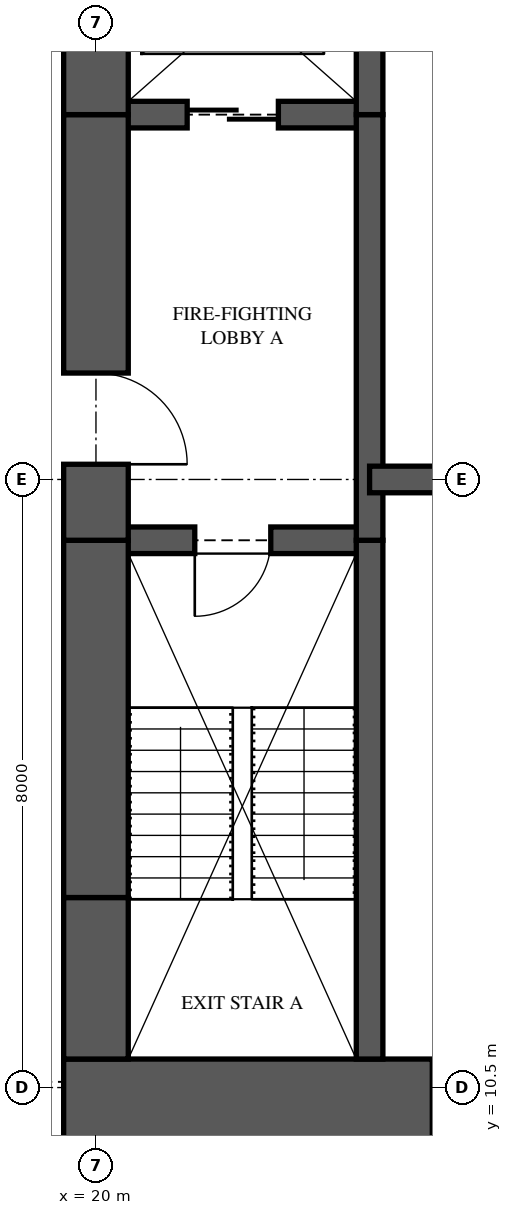
"""IFC4 building model, lengths in metres.
Left out: names, types, materials, properties, quantities, classifications, styles, units other than length and angle.
Written with IfcOpenShell. Run it as: python <this file> out.ifc"""

import sys

from ifc_helpers import new_model, si_unit, direction, frame, frame_2d, origin, place, context, subcontext, project, spatial, rectangle, extrude, element, fill, save


model = new_model("IFC4")
c1 = context("Model", 3, precision=1e-05, world=origin(), true_north=direction((0.0, 1.0)))
c2 = subcontext(c1, "Body", "Model", "MODEL_VIEW")
j1 = project(units=[si_unit("LENGTHUNIT", "METRE"), si_unit("PLANEANGLEUNIT", "RADIAN")], contexts=[c1])
p1 = place(None, origin())
s1 = spatial("IfcSite", under=j1, at=p1, CompositionType="ELEMENT")
p2 = place(p1, origin())
s2 = spatial("IfcBuilding", under=s1, at=p2, CompositionType="ELEMENT")
p3 = place(p2, frame((0.0, 0.0, 124.95)))
s3 = spatial("IfcBuildingStorey", under=s2, at=p3, CompositionType="ELEMENT", Elevation=124.95)
p4 = place(p3, frame((19.575, 10.125, 0.0), z_axis=(0.0, 0.0, 1.0), x_axis=(1.0, 0.0, 0.0)))
e1 = element("IfcWall", 1, at=p4, inside=s3, PredefinedType="SHEAR", context=c2, shape_type="SweptSolid", body=[
    extrude(rectangle(XDim=6.425, YDim=1.5, at=frame_2d((3.212, 0.0))), origin(), (0.0, 0.0, 1.0), 3.35),
])
p5 = place(p4, frame((4.85, 0.0, 0.0)))
e2 = element("IfcOpeningElement", 2, at=p5, cuts=e1, PredefinedType="OPENING", context=c2, shape_type="SweptSolid", body=[
    extrude(rectangle(XDim=0.75, YDim=2.1, at=frame_2d((0.375, 1.05))), frame((0.0, 0.76, 0.0), z_axis=(0.0, -1.0, 0.0), x_axis=(1.0, 0.0, 0.0)), (0.0, 0.0, 1.0), 1.52),
])
p6 = place(p3, frame((20.0, 26.125, 0.0), z_axis=(0.0, 0.0, 1.0), x_axis=(0.0, -1.0, 0.0)))
e3 = element("IfcWall", 3, at=p6, inside=s3, PredefinedType="SHEAR", context=c2, shape_type="SweptSolid", body=[
    extrude(rectangle(XDim=2.825, YDim=0.85, at=frame_2d((1.413, 0.0))), origin(), (0.0, 0.0, 1.0), 3.35),
])
p7 = place(p3, frame((20.0, 23.3, 0.0), z_axis=(0.0, 0.0, 1.0), x_axis=(0.0, -1.0, 0.0)))
e4 = element("IfcWall", 4, at=p7, inside=s3, PredefinedType="SHEAR", context=c2, shape_type="SweptSolid", body=[
    extrude(rectangle(XDim=5.6, YDim=0.85, at=frame_2d((2.8, 0.0))), origin(), (0.0, 0.0, 1.0), 3.35),
])
p8 = place(p7, frame((3.4, 0.0, 0.0)))
e5 = element("IfcOpeningElement", 5, at=p8, cuts=e4, PredefinedType="OPENING", context=c2, shape_type="SweptSolid", body=[
    extrude(rectangle(XDim=1.2, YDim=2.2, at=frame_2d((0.6, 1.1))), frame((0.0, 0.435, 0.0), z_axis=(0.0, -1.0, 0.0), x_axis=(1.0, 0.0, 0.0)), (0.0, 0.0, 1.0), 0.87),
])
p9 = place(p3, frame((20.0, 17.7, 0.0), z_axis=(0.0, 0.0, 1.0), x_axis=(0.0, -1.0, 0.0)))
e6 = element("IfcWall", 6, at=p9, inside=s3, PredefinedType="SHEAR", context=c2, shape_type="SweptSolid", body=[
    extrude(rectangle(XDim=4.7, YDim=0.85, at=frame_2d((2.35, 0.0))), origin(), (0.0, 0.0, 1.0), 3.35),
])
p10 = place(p3, frame((20.0, 13.0, 0.0), z_axis=(0.0, 0.0, 1.0), x_axis=(0.0, -1.0, 0.0)))
e7 = element("IfcWall", 7, at=p10, inside=s3, PredefinedType="SHEAR", context=c2, shape_type="SweptSolid", body=[
    extrude(rectangle(XDim=2.125, YDim=0.85, at=frame_2d((1.062, 0.0))), origin(), (0.0, 0.0, 1.0), 3.35),
])
p11 = place(p3, frame((23.6, 10.875, 0.0), z_axis=(0.0, 0.0, 1.0), x_axis=(0.0, 1.0, 0.0)))
e8 = element("IfcWall", 8, at=p11, inside=s3, PredefinedType="SHEAR", context=c2, shape_type="SweptSolid", body=[
    extrude(rectangle(XDim=6.825, YDim=0.35, at=frame_2d((3.413, 0.0))), origin(), (0.0, 0.0, 1.0), 3.35),
])
p12 = place(p3, frame((23.6, 17.7, 0.0), z_axis=(0.0, 0.0, 1.0), x_axis=(0.0, 1.0, 0.0)))
e9 = element("IfcWall", 9, at=p12, inside=s3, PredefinedType="SHEAR", context=c2, shape_type="SweptSolid", body=[
    extrude(rectangle(XDim=5.6, YDim=0.35, at=frame_2d((2.8, 0.0))), origin(), (0.0, 0.0, 1.0), 3.35),
])
p13 = place(p3, frame((23.6, 23.3, 0.0), z_axis=(0.0, 0.0, 1.0), x_axis=(0.0, 1.0, 0.0)))
e10 = element("IfcWall", 10, at=p13, inside=s3, PredefinedType="SHEAR", context=c2, shape_type="SweptSolid", body=[
    extrude(rectangle(XDim=2.825, YDim=0.35, at=frame_2d((1.413, 0.0))), origin(), (0.0, 0.0, 1.0), 3.35),
])
p14 = place(p3, frame((20.0, 17.7, 0.0), z_axis=(0.0, 0.0, 1.0), x_axis=(1.0, 0.0, 0.0)))
e11 = element("IfcWall", 11, at=p14, inside=s3, PredefinedType="SHEAR", context=c2, shape_type="SweptSolid", body=[
    extrude(rectangle(XDim=3.6, YDim=0.35, at=frame_2d((1.8, 0.0))), origin(), (0.0, 0.0, 1.0), 3.35),
])
p15 = place(p14, frame((1.3, 0.0, 0.0)))
e12 = element("IfcOpeningElement", 12, at=p15, cuts=e11, PredefinedType="OPENING", context=c2, shape_type="SweptSolid", body=[
    extrude(rectangle(XDim=1.0, YDim=2.1, at=frame_2d((0.5, 1.05))), frame((0.0, 0.185, 0.0), z_axis=(0.0, -1.0, 0.0), x_axis=(1.0, 0.0, 0.0)), (0.0, 0.0, 1.0), 0.37),
])
p16 = place(p3, frame((20.0, 23.3, 0.0), z_axis=(0.0, 0.0, 1.0), x_axis=(1.0, 0.0, 0.0)))
e13 = element("IfcWall", 13, at=p16, inside=s3, PredefinedType="SHEAR", context=c2, shape_type="SweptSolid", body=[
    extrude(rectangle(XDim=3.6, YDim=0.35, at=frame_2d((1.8, 0.0))), origin(), (0.0, 0.0, 1.0), 3.35),
])
p17 = place(p16, frame((1.2, 0.0, 0.0)))
e14 = element("IfcOpeningElement", 14, at=p17, cuts=e13, PredefinedType="OPENING", context=c2, shape_type="SweptSolid", body=[
    extrude(rectangle(XDim=1.2, YDim=2.1, at=frame_2d((0.6, 1.05))), frame((0.0, 0.185, 0.0), z_axis=(0.0, -1.0, 0.0), x_axis=(1.0, 0.0, 0.0)), (0.0, 0.0, 1.0), 0.37),
])
p18 = place(p3, frame((23.6, 18.5, 0.0), z_axis=(0.0, 0.0, 1.0), x_axis=(1.0, 0.0, 0.0)))
e15 = element("IfcWall", 15, at=p18, inside=s3, PredefinedType="SHEAR", context=c2, shape_type="SweptSolid", body=[
    extrude(rectangle(XDim=2.4, YDim=0.35, at=frame_2d((1.2, 0.0))), origin(), (0.0, 0.0, 1.0), 3.35),
])
p19 = place(p15, frame((1.0, 0.0, 0.0), z_axis=(0.0, 0.0, 1.0), x_axis=(-1.0, 0.0, 0.0)))
e16 = element("IfcDoor", 16, at=p19, inside=s3, OperationType="SINGLE_SWING_RIGHT", PredefinedType="DOOR", context=c2, shape_type="SweptSolid", body=[
    extrude(rectangle(XDim=1.0, YDim=2.1, at=frame_2d((0.5, 1.05))), frame((0.0, 0.025, 0.0), z_axis=(0.0, -1.0, 0.0), x_axis=(1.0, 0.0, 0.0)), (0.0, 0.0, 1.0), 0.05),
])
fill(e12, e16)
p20 = place(p8, origin())
e17 = element("IfcDoor", 17, at=p20, inside=s3, OperationType="SINGLE_SWING_RIGHT", PredefinedType="DOOR", context=c2, shape_type="SweptSolid", body=[
    extrude(rectangle(XDim=1.2, YDim=2.2, at=frame_2d((0.6, 1.1))), frame((0.0, 0.025, 0.0), z_axis=(0.0, -1.0, 0.0), x_axis=(1.0, 0.0, 0.0)), (0.0, 0.0, 1.0), 0.05),
])
fill(e5, e17)
p21 = place(p17, origin())
e18 = element("IfcDoor", 18, at=p21, inside=s3, OperationType="SLIDING_TO_LEFT", PredefinedType="DOOR", context=c2, shape_type="SweptSolid", body=[
    extrude(rectangle(XDim=1.2, YDim=2.1, at=frame_2d((0.6, 1.05))), frame((0.0, 0.025, 0.0), z_axis=(0.0, -1.0, 0.0), x_axis=(1.0, 0.0, 0.0)), (0.0, 0.0, 1.0), 0.05),
])
fill(e14, e18)
save(model, sys.argv[1])
